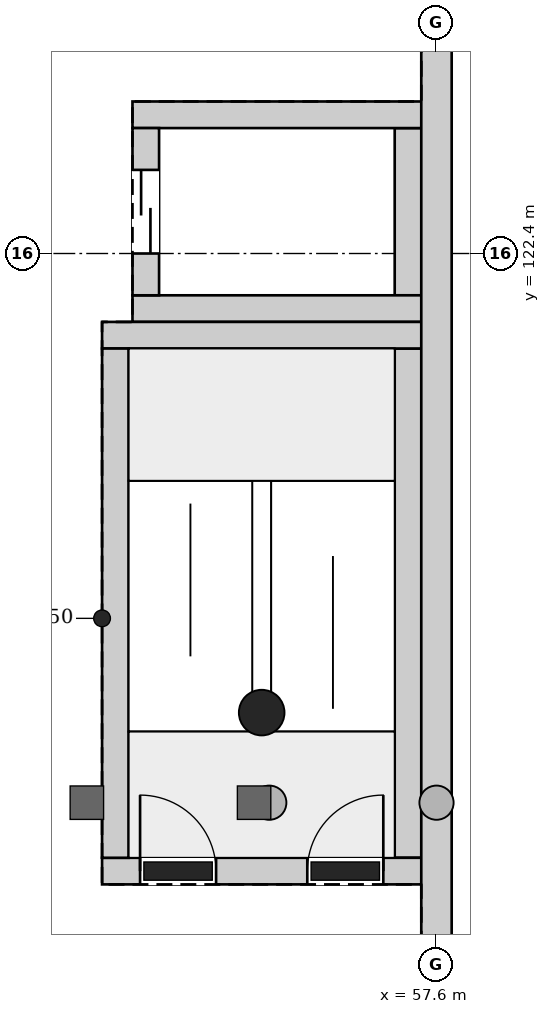
"""IFC4 building model, lengths in metres.
Left out: names, types, materials, properties, quantities, classifications, styles, units other than length and angle.
Written with IfcOpenShell. Run it as: python <this file> out.ifc"""

import sys

from ifc_helpers import new_model, si_unit, direction, frame, frame_2d, origin, place, context, subcontext, project, spatial, rectangle, extrude, element, fill, save


model = new_model("IFC4")
c1 = context("Model", 3, precision=1e-05, world=origin(), true_north=direction((0.0, 1.0)))
c2 = subcontext(c1, "Body", "Model", "MODEL_VIEW")
j1 = project(units=[si_unit("LENGTHUNIT", "METRE"), si_unit("PLANEANGLEUNIT", "RADIAN")], contexts=[c1])
p1 = place(None, origin())
s1 = spatial("IfcSite", under=j1, at=p1, CompositionType="ELEMENT")
p2 = place(p1, origin())
s2 = spatial("IfcBuilding", under=s1, at=p2, CompositionType="ELEMENT")
p3 = place(p2, frame((0.0, 0.0, 6.5)))
s3 = spatial("IfcBuildingStorey", under=s2, at=p3, CompositionType="ELEMENT", Elevation=6.5)
p4 = place(p3, frame((57.6, 94.12, 0.0), z_axis=(0.0, 0.0, 1.0), x_axis=(0.0, 1.0, 0.0)))
e1 = element("IfcWall", 1, at=p4, inside=s3, PredefinedType="SHEAR", context=c2, shape_type="SweptSolid", body=[
    extrude(rectangle(XDim=46.88, YDim=0.4, at=frame_2d((23.44, 0.0))), origin(), (0.0, 0.0, 1.0), 7.7),
])
p5 = place(p3, frame((53.2, 114.275, 0.0), z_axis=(0.0, 0.0, 1.0), x_axis=(1.0, 0.0, 0.0)))
e2 = element("IfcWall", 2, at=p5, inside=s3, PredefinedType="SHEAR", context=c2, shape_type="SweptSolid", body=[
    extrude(rectangle(XDim=4.2, YDim=0.35, at=frame_2d((2.1, 0.0))), origin(), (0.0, 0.0, 1.0), 7.7),
])
p6 = place(p5, frame((0.5, 0.0, 0.0)))
e3 = element("IfcOpeningElement", 3, at=p6, cuts=e2, PredefinedType="OPENING", context=c2, shape_type="SweptSolid", body=[
    extrude(rectangle(XDim=1.0, YDim=2.1, at=frame_2d((0.5, 1.05))), frame((0.0, 0.185, 0.0), z_axis=(0.0, -1.0, 0.0), x_axis=(1.0, 0.0, 0.0)), (0.0, 0.0, 1.0), 0.37),
])
p7 = place(p5, frame((2.7, 0.0, 0.0)))
e4 = element("IfcOpeningElement", 4, at=p7, cuts=e2, PredefinedType="OPENING", context=c2, shape_type="SweptSolid", body=[
    extrude(rectangle(XDim=1.0, YDim=2.1, at=frame_2d((0.5, 1.05))), frame((0.0, 0.185, 0.0), z_axis=(0.0, -1.0, 0.0), x_axis=(1.0, 0.0, 0.0)), (0.0, 0.0, 1.0), 0.37),
])
p8 = place(p3, frame((53.2, 121.325, 0.0), z_axis=(0.0, 0.0, 1.0), x_axis=(1.0, 0.0, 0.0)))
e5 = element("IfcWall", 5, at=p8, inside=s3, PredefinedType="SHEAR", context=c2, shape_type="SweptSolid", body=[
    extrude(rectangle(XDim=4.2, YDim=0.35, at=frame_2d((2.1, 0.0))), origin(), (0.0, 0.0, 1.0), 7.7),
])
for number, where, z_axis, x_axis in (
    (6, (53.375, 114.45, 0.0), (0.0, 0.0, 1.0), (0.0, 1.0, 0.0)),
    (7, (57.225, 114.45, 0.0), (0.0, 0.0, 1.0), (0.0, 1.0, 0.0)),
):
    element("IfcWall", number, at=place(p3, frame(where, z_axis=z_axis, x_axis=x_axis)), inside=s3, PredefinedType="SHEAR", context=c2, shape_type="SweptSolid", body=[
        extrude(rectangle(XDim=6.7, YDim=0.35, at=frame_2d((3.35, 0.0))), origin(), (0.0, 0.0, 1.0), 7.7),
    ])
for number, where, z_axis, x_axis in (
    (8, (53.6, 121.675, 0.0), (0.0, 0.0, 1.0), (1.0, 0.0, 0.0)),
    (9, (53.6, 124.225, 0.0), (0.0, 0.0, 1.0), (1.0, 0.0, 0.0)),
):
    element("IfcWall", number, at=place(p3, frame(where, z_axis=z_axis, x_axis=x_axis)), inside=s3, PredefinedType="SHEAR", context=c2, shape_type="SweptSolid", body=[
        extrude(rectangle(XDim=3.8, YDim=0.35, at=frame_2d((1.9, 0.0))), origin(), (0.0, 0.0, 1.0), 7.7),
    ])
p9 = place(p3, frame((53.775, 121.85, 0.0), z_axis=(0.0, 0.0, 1.0), x_axis=(0.0, 1.0, 0.0)))
e10 = element("IfcWall", 10, at=p9, inside=s3, PredefinedType="SHEAR", context=c2, shape_type="SweptSolid", body=[
    extrude(rectangle(XDim=2.2, YDim=0.35, at=frame_2d((1.1, 0.0))), origin(), (0.0, 0.0, 1.0), 7.7),
])
p10 = place(p9, frame((0.55, 0.0, 0.0)))
e11 = element("IfcOpeningElement", 11, at=p10, cuts=e10, PredefinedType="OPENING", context=c2, shape_type="SweptSolid", body=[
    extrude(rectangle(XDim=1.1, YDim=2.1, at=frame_2d((0.55, 1.05))), frame((0.0, 0.185, 0.0), z_axis=(0.0, -1.0, 0.0), x_axis=(1.0, 0.0, 0.0)), (0.0, 0.0, 1.0), 0.37),
])
p11 = place(p3, frame((57.225, 121.85, 0.0), z_axis=(0.0, 0.0, 1.0), x_axis=(0.0, 1.0, 0.0)))
e12 = element("IfcWall", 12, at=p11, inside=s3, PredefinedType="SHEAR", context=c2, shape_type="SweptSolid", body=[
    extrude(rectangle(XDim=2.2, YDim=0.35, at=frame_2d((1.1, 0.0))), origin(), (0.0, 0.0, 1.0), 7.7),
])
p12 = place(p6, origin())
e13 = element("IfcDoor", 13, at=p12, inside=s3, OperationType="SINGLE_SWING_RIGHT", PredefinedType="DOOR", context=c2, shape_type="SweptSolid", body=[
    extrude(rectangle(XDim=1.0, YDim=2.1, at=frame_2d((0.5, 1.05))), frame((0.0, 0.025, 0.0), z_axis=(0.0, -1.0, 0.0), x_axis=(1.0, 0.0, 0.0)), (0.0, 0.0, 1.0), 0.05),
])
fill(e3, e13)
p13 = place(p7, origin())
e14 = element("IfcDoor", 14, at=p13, inside=s3, OperationType="SINGLE_SWING_LEFT", PredefinedType="DOOR", context=c2, shape_type="SweptSolid", body=[
    extrude(rectangle(XDim=1.0, YDim=2.1, at=frame_2d((0.5, 1.05))), frame((0.0, 0.025, 0.0), z_axis=(0.0, -1.0, 0.0), x_axis=(1.0, 0.0, 0.0)), (0.0, 0.0, 1.0), 0.05),
])
fill(e4, e14)
p14 = place(p10, origin())
e15 = element("IfcDoor", 15, at=p14, inside=s3, OperationType="DOUBLE_DOOR_SLIDING", PredefinedType="DOOR", context=c2, shape_type="SweptSolid", body=[
    extrude(rectangle(XDim=1.1, YDim=2.1, at=frame_2d((0.55, 1.05))), frame((0.0, 0.025, 0.0), z_axis=(0.0, -1.0, 0.0), x_axis=(1.0, 0.0, 0.0)), (0.0, 0.0, 1.0), 0.05),
])
fill(e11, e15)
save(model, sys.argv[1])
